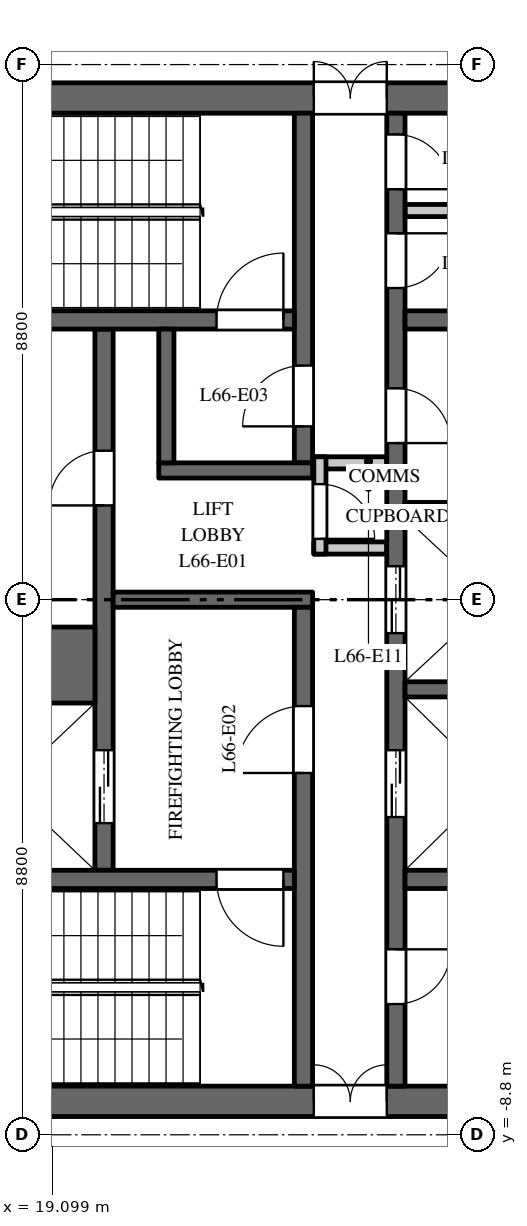
"""IFC4 building model, lengths in metres.
Left out: names, types, materials, properties, quantities, classifications, styles, units other than length and angle.
Written with IfcOpenShell. Run it as: python <this file> out.ifc"""

import sys

from ifc_helpers import new_model, si_unit, direction, frame, frame_2d, origin, place, context, subcontext, project, spatial, rectangle, extrude, element, fill, save


model = new_model("IFC4")
c1 = context("Model", 3, precision=1e-05, world=origin(), true_north=direction((0.0, 1.0)))
c2 = subcontext(c1, "Body", "Model", "MODEL_VIEW")
j1 = project(units=[si_unit("LENGTHUNIT", "METRE"), si_unit("PLANEANGLEUNIT", "RADIAN")], contexts=[c1])
p1 = place(None, origin())
s1 = spatial("IfcSite", under=j1, at=p1, CompositionType="ELEMENT")
p2 = place(p1, origin())
s2 = spatial("IfcBuilding", under=s1, at=p2, CompositionType="ELEMENT")
p3 = place(p2, frame((0.0, 0.0, 307.0)))
s3 = spatial("IfcBuildingStorey", under=s2, at=p3, CompositionType="ELEMENT", Elevation=307.0)
p4 = place(p3, frame((16.5, 8.25, 0.0), z_axis=(0.0, 0.0, 1.0), x_axis=(1.0, 0.0, 0.0)))
e1 = element("IfcWall", 1, at=p4, inside=s3, PredefinedType="SHEAR", context=c2, shape_type="SweptSolid", body=[
    extrude(rectangle(XDim=15.0, YDim=0.5, at=frame_2d((7.5, 0.0))), origin(), (0.0, 0.0, 1.0), 3.7),
])
p5 = place(p4, frame((6.9, 0.0, 0.0)))
e2 = element("IfcOpeningElement", 2, at=p5, cuts=e1, PredefinedType="OPENING", context=c2, shape_type="SweptSolid", body=[
    extrude(rectangle(XDim=1.2, YDim=2.1, at=frame_2d((0.6, 1.05))), frame((0.0, 0.26, 0.0), z_axis=(0.0, -1.0, 0.0), x_axis=(1.0, 0.0, 0.0)), (0.0, 0.0, 1.0), 0.52),
])
p6 = place(p4, frame((12.275, 0.0, 0.0)))
e3 = element("IfcOpeningElement", 3, at=p6, cuts=e1, PredefinedType="OPENING", context=c2, shape_type="SweptSolid", body=[
    extrude(rectangle(XDim=0.9, YDim=2.1, at=frame_2d((0.45, 1.05))), frame((0.0, 0.26, 0.0), z_axis=(0.0, -1.0, 0.0), x_axis=(1.0, 0.0, 0.0)), (0.0, 0.0, 1.0), 0.52),
])
p7 = place(p3, frame((16.5, -8.25, 0.0), z_axis=(0.0, 0.0, 1.0), x_axis=(1.0, 0.0, 0.0)))
e4 = element("IfcWall", 4, at=p7, inside=s3, PredefinedType="SHEAR", context=c2, shape_type="SweptSolid", body=[
    extrude(rectangle(XDim=15.0, YDim=0.5, at=frame_2d((7.5, 0.0))), origin(), (0.0, 0.0, 1.0), 3.7),
])
p8 = place(p7, frame((6.9, 0.0, 0.0)))
e5 = element("IfcOpeningElement", 5, at=p8, cuts=e4, PredefinedType="OPENING", context=c2, shape_type="SweptSolid", body=[
    extrude(rectangle(XDim=1.2, YDim=2.1, at=frame_2d((0.6, 1.05))), frame((0.0, 0.26, 0.0), z_axis=(0.0, -1.0, 0.0), x_axis=(1.0, 0.0, 0.0)), (0.0, 0.0, 1.0), 0.52),
])
p9 = place(p7, frame((12.95, 0.0, 0.0)))
e6 = element("IfcOpeningElement", 6, at=p9, cuts=e4, PredefinedType="OPENING", context=c2, shape_type="SweptSolid", body=[
    extrude(rectangle(XDim=0.9, YDim=2.1, at=frame_2d((0.45, 1.05))), frame((0.0, 0.26, 0.0), z_axis=(0.0, -1.0, 0.0), x_axis=(1.0, 0.0, 0.0)), (0.0, 0.0, 1.0), 0.52),
])
p10 = place(p3, frame((19.95, -4.45, 0.0), z_axis=(0.0, 0.0, 1.0), x_axis=(0.0, 1.0, 0.0)))
e7 = element("IfcWall", 7, at=p10, inside=s3, PredefinedType="SHEAR", context=c2, shape_type="SweptSolid", body=[
    extrude(rectangle(XDim=8.9, YDim=0.3, at=frame_2d((4.45, 0.0))), origin(), (0.0, 0.0, 1.0), 3.7),
])
p11 = place(p10, frame((0.775, 0.0, 0.0)))
e8 = element("IfcOpeningElement", 8, at=p11, cuts=e7, PredefinedType="OPENING", context=c2, shape_type="SweptSolid", body=[
    extrude(rectangle(XDim=1.2, YDim=2.1, at=frame_2d((0.6, 1.05))), frame((0.0, 0.16, 0.0), z_axis=(0.0, -1.0, 0.0), x_axis=(1.0, 0.0, 0.0)), (0.0, 0.0, 1.0), 0.32),
])
p12 = place(p10, frame((6.0, 0.0, 0.0)))
e9 = element("IfcOpeningElement", 9, at=p12, cuts=e7, PredefinedType="OPENING", context=c2, shape_type="SweptSolid", body=[
    extrude(rectangle(XDim=0.9, YDim=2.1, at=frame_2d((0.45, 1.05))), frame((0.0, 0.16, 0.0), z_axis=(0.0, -1.0, 0.0), x_axis=(1.0, 0.0, 0.0)), (0.0, 0.0, 1.0), 0.32),
])
p13 = place(p3, frame((24.75, -8.0, 0.0), z_axis=(0.0, 0.0, 1.0), x_axis=(0.0, 1.0, 0.0)))
e10 = element("IfcWall", 10, at=p13, inside=s3, PredefinedType="SHEAR", context=c2, shape_type="SweptSolid", body=[
    extrude(rectangle(XDim=16.0, YDim=0.3, at=frame_2d((8.0, 0.0))), origin(), (0.0, 0.0, 1.0), 3.7),
])
p14 = place(p13, frame((4.425, 0.0, 0.0)))
e11 = element("IfcOpeningElement", 11, at=p14, cuts=e10, PredefinedType="OPENING", context=c2, shape_type="SweptSolid", body=[
    extrude(rectangle(XDim=1.1, YDim=2.1, at=frame_2d((0.55, 1.05))), frame((0.0, 0.16, 0.0), z_axis=(0.0, -1.0, 0.0), x_axis=(1.0, 0.0, 0.0)), (0.0, 0.0, 1.0), 0.32),
])
p15 = place(p13, frame((7.45, 0.0, 0.0)))
e12 = element("IfcOpeningElement", 12, at=p15, cuts=e10, PredefinedType="OPENING", context=c2, shape_type="SweptSolid", body=[
    extrude(rectangle(XDim=1.1, YDim=2.1, at=frame_2d((0.55, 1.05))), frame((0.0, 0.16, 0.0), z_axis=(0.0, -1.0, 0.0), x_axis=(1.0, 0.0, 0.0)), (0.0, 0.0, 1.0), 0.32),
])
p16 = place(p13, frame((10.575, 0.0, 0.0)))
e13 = element("IfcOpeningElement", 13, at=p16, cuts=e10, PredefinedType="OPENING", context=c2, shape_type="SweptSolid", body=[
    extrude(rectangle(XDim=0.9, YDim=2.1, at=frame_2d((0.45, 1.05))), frame((0.0, 0.16, 0.0), z_axis=(0.0, -1.0, 0.0), x_axis=(1.0, 0.0, 0.0)), (0.0, 0.0, 1.0), 0.32),
])
p17 = place(p13, frame((13.125, 0.0, 0.0)))
e14 = element("IfcOpeningElement", 14, at=p17, cuts=e10, PredefinedType="OPENING", context=c2, shape_type="SweptSolid", body=[
    extrude(rectangle(XDim=0.9, YDim=2.1, at=frame_2d((0.45, 1.05))), frame((0.0, 0.16, 0.0), z_axis=(0.0, -1.0, 0.0), x_axis=(1.0, 0.0, 0.0)), (0.0, 0.0, 1.0), 0.32),
])
p18 = place(p13, frame((14.75, 0.0, 0.0)))
e15 = element("IfcOpeningElement", 15, at=p18, cuts=e10, PredefinedType="OPENING", context=c2, shape_type="SweptSolid", body=[
    extrude(rectangle(XDim=0.9, YDim=2.1, at=frame_2d((0.45, 1.05))), frame((0.0, 0.16, 0.0), z_axis=(0.0, -1.0, 0.0), x_axis=(1.0, 0.0, 0.0)), (0.0, 0.0, 1.0), 0.32),
])
p19 = place(p13, frame((1.35, 0.0, 0.0)))
e16 = element("IfcOpeningElement", 16, at=p19, cuts=e10, PredefinedType="OPENING", context=c2, shape_type="SweptSolid", body=[
    extrude(rectangle(XDim=0.9, YDim=2.1, at=frame_2d((0.45, 1.05))), frame((0.0, 0.16, 0.0), z_axis=(0.0, -1.0, 0.0), x_axis=(1.0, 0.0, 0.0)), (0.0, 0.0, 1.0), 0.32),
])
p20 = place(p3, frame((20.1, 0.0, 0.0), z_axis=(0.0, 0.0, 1.0), x_axis=(1.0, 0.0, 0.0)))
e17 = element("IfcWall", 17, at=p20, inside=s3, PredefinedType="SHEAR", context=c2, shape_type="SweptSolid", body=[
    extrude(rectangle(XDim=3.28, YDim=0.25, at=frame_2d((1.64, 0.0))), origin(), (0.0, 0.0, 1.0), 3.7),
])
for number, where, z_axis, x_axis in (
    (18, (23.4, 0.85, 0.0), (0.0, 0.0, 1.0), (1.0, 0.0, 0.0)),
    (19, (23.4, 2.25, 0.0), (0.0, 0.0, 1.0), (1.0, 0.0, 0.0)),
):
    element("IfcWall", number, at=place(p3, frame(where, z_axis=z_axis, x_axis=x_axis)), inside=s3, PredefinedType="PARTITIONING", context=c2, shape_type="SweptSolid", body=[
        extrude(rectangle(XDim=1.2, YDim=0.2, at=frame_2d((0.6, 0.0))), origin(), (0.0, 0.0, 1.0), 3.7),
    ])
p21 = place(p3, frame((23.5, 0.75, 0.0), z_axis=(0.0, 0.0, 1.0), x_axis=(0.0, 1.0, 0.0)))
e20 = element("IfcWall", 20, at=p21, inside=s3, PredefinedType="PARTITIONING", context=c2, shape_type="SweptSolid", body=[
    extrude(rectangle(XDim=1.6, YDim=0.2, at=frame_2d((0.8, 0.0))), origin(), (0.0, 0.0, 1.0), 3.7),
])
p22 = place(p21, frame((0.25, 0.0, 0.0)))
e21 = element("IfcOpeningElement", 21, at=p22, cuts=e20, PredefinedType="OPENING", context=c2, shape_type="SweptSolid", body=[
    extrude(rectangle(XDim=0.9, YDim=2.1, at=frame_2d((0.45, 1.05))), frame((0.0, 0.11, 0.0), z_axis=(0.0, -1.0, 0.0), x_axis=(1.0, 0.0, 0.0)), (0.0, 0.0, 1.0), 0.22),
])
p23 = place(p3, frame((24.9, 4.6, 0.0), z_axis=(0.0, 0.0, 1.0), x_axis=(1.0, 0.0, 0.0)))
e22 = element("IfcWall", 22, at=p23, inside=s3, PredefinedType="SHEAR", context=c2, shape_type="SweptSolid", body=[
    extrude(rectangle(XDim=6.1, YDim=0.3, at=frame_2d((3.05, 0.0))), origin(), (0.0, 0.0, 1.0), 3.7),
])
p24 = place(p3, frame((24.9, 6.4, 0.0), z_axis=(0.0, 0.0, 1.0), x_axis=(1.0, 0.0, 0.0)))
e23 = element("IfcWall", 23, at=p24, inside=s3, PredefinedType="PARTITIONING", context=c2, shape_type="SweptSolid", body=[
    extrude(rectangle(XDim=2.35, YDim=0.2, at=frame_2d((1.175, 0.0))), origin(), (0.0, 0.0, 1.0), 3.7),
])
p25 = place(p3, frame((24.9, -4.6, 0.0), z_axis=(0.0, 0.0, 1.0), x_axis=(1.0, 0.0, 0.0)))
e24 = element("IfcWall", 24, at=p25, inside=s3, PredefinedType="SHEAR", context=c2, shape_type="SweptSolid", body=[
    extrude(rectangle(XDim=6.1, YDim=0.3, at=frame_2d((3.05, 0.0))), origin(), (0.0, 0.0, 1.0), 3.7),
])
p26 = place(p25, frame((4.2, 0.0, 0.0)))
e25 = element("IfcOpeningElement", 25, at=p26, cuts=e24, PredefinedType="OPENING", context=c2, shape_type="SweptSolid", body=[
    extrude(rectangle(XDim=0.9, YDim=2.1, at=frame_2d((0.45, 1.05))), frame((0.0, 0.16, 0.0), z_axis=(0.0, -1.0, 0.0), x_axis=(1.0, 0.0, 0.0)), (0.0, 0.0, 1.0), 0.32),
])
p27 = place(p3, frame((16.9, -1.075, 0.0), z_axis=(0.0, 0.0, 1.0), x_axis=(1.0, 0.0, 0.0)))
e26 = element("IfcWall", 26, at=p27, inside=s3, PredefinedType="SHEAR", context=c2, shape_type="SweptSolid", body=[
    extrude(rectangle(XDim=2.9, YDim=1.25, at=frame_2d((1.45, 0.0))), origin(), (0.0, 0.0, 1.0), 3.7),
])
for number, where, z_axis, x_axis in (
    (27, (24.9, -1.475, 0.0), (0.0, 0.0, 1.0), (1.0, 0.0, 0.0)),
    (28, (24.9, 1.475, 0.0), (0.0, 0.0, 1.0), (1.0, 0.0, 0.0)),
):
    element("IfcWall", number, at=place(p3, frame(where, z_axis=z_axis, x_axis=x_axis)), inside=s3, PredefinedType="SHEAR", context=c2, shape_type="SweptSolid", body=[
        extrude(rectangle(XDim=2.9, YDim=0.25, at=frame_2d((1.45, 0.0))), origin(), (0.0, 0.0, 1.0), 3.7),
    ])
p28 = place(p3, frame((23.23, 2.25, 0.0), z_axis=(0.0, 0.0, 1.0), x_axis=(0.0, 1.0, 0.0)))
e29 = element("IfcWall", 29, at=p28, inside=s3, PredefinedType="SHEAR", context=c2, shape_type="SweptSolid", body=[
    extrude(rectangle(XDim=5.75, YDim=0.3, at=frame_2d((2.875, 0.0))), origin(), (0.0, 0.0, 1.0), 3.7),
])
p29 = place(p28, frame((0.6, 0.0, 0.0)))
e30 = element("IfcOpeningElement", 30, at=p29, cuts=e29, PredefinedType="OPENING", context=c2, shape_type="SweptSolid", body=[
    extrude(rectangle(XDim=1.0, YDim=2.1, at=frame_2d((0.5, 1.05))), frame((0.0, 0.16, 0.0), z_axis=(0.0, -1.0, 0.0), x_axis=(1.0, 0.0, 0.0)), (0.0, 0.0, 1.0), 0.32),
])
p30 = place(p3, frame((23.23, -8.0, 0.0), z_axis=(0.0, 0.0, 1.0), x_axis=(0.0, 1.0, 0.0)))
e31 = element("IfcWall", 31, at=p30, inside=s3, PredefinedType="SHEAR", context=c2, shape_type="SweptSolid", body=[
    extrude(rectangle(XDim=7.875, YDim=0.3, at=frame_2d((3.938, 0.0))), origin(), (0.0, 0.0, 1.0), 3.7),
])
p31 = place(p30, frame((5.15, 0.0, 0.0)))
e32 = element("IfcOpeningElement", 32, at=p31, cuts=e31, PredefinedType="OPENING", context=c2, shape_type="SweptSolid", body=[
    extrude(rectangle(XDim=1.1, YDim=2.1, at=frame_2d((0.55, 1.05))), frame((0.0, 0.16, 0.0), z_axis=(0.0, -1.0, 0.0), x_axis=(1.0, 0.0, 0.0)), (0.0, 0.0, 1.0), 0.32),
])
p32 = place(p3, frame((16.9, 4.6, 0.0), z_axis=(0.0, 0.0, 1.0), x_axis=(1.0, 0.0, 0.0)))
e33 = element("IfcWall", 33, at=p32, inside=s3, PredefinedType="SHEAR", context=c2, shape_type="SweptSolid", body=[
    extrude(rectangle(XDim=6.18, YDim=0.3, at=frame_2d((3.09, 0.0))), origin(), (0.0, 0.0, 1.0), 3.7),
])
p33 = place(p32, frame((4.9, 0.0, 0.0)))
e34 = element("IfcOpeningElement", 34, at=p33, cuts=e33, PredefinedType="OPENING", context=c2, shape_type="SweptSolid", body=[
    extrude(rectangle(XDim=1.1, YDim=2.1, at=frame_2d((0.55, 1.05))), frame((0.0, 0.16, 0.0), z_axis=(0.0, -1.0, 0.0), x_axis=(1.0, 0.0, 0.0)), (0.0, 0.0, 1.0), 0.32),
])
p34 = place(p3, frame((16.9, -4.6, 0.0), z_axis=(0.0, 0.0, 1.0), x_axis=(1.0, 0.0, 0.0)))
e35 = element("IfcWall", 35, at=p34, inside=s3, PredefinedType="SHEAR", context=c2, shape_type="SweptSolid", body=[
    extrude(rectangle(XDim=6.18, YDim=0.3, at=frame_2d((3.09, 0.0))), origin(), (0.0, 0.0, 1.0), 3.7),
])
p35 = place(p34, frame((4.9, 0.0, 0.0)))
e36 = element("IfcOpeningElement", 36, at=p35, cuts=e35, PredefinedType="OPENING", context=c2, shape_type="SweptSolid", body=[
    extrude(rectangle(XDim=1.1, YDim=2.1, at=frame_2d((0.55, 1.05))), frame((0.0, 0.16, 0.0), z_axis=(0.0, -1.0, 0.0), x_axis=(1.0, 0.0, 0.0)), (0.0, 0.0, 1.0), 0.32),
])
p36 = place(p3, frame((20.85, 2.125, 0.0), z_axis=(0.0, 0.0, 1.0), x_axis=(1.0, 0.0, 0.0)))
e37 = element("IfcWall", 37, at=p36, inside=s3, PredefinedType="SHEAR", context=c2, shape_type="SweptSolid", body=[
    extrude(rectangle(XDim=2.53, YDim=0.25, at=frame_2d((1.265, 0.0))), origin(), (0.0, 0.0, 1.0), 3.7),
])
p37 = place(p3, frame((20.975, 2.25, 0.0), z_axis=(0.0, 0.0, 1.0), x_axis=(0.0, 1.0, 0.0)))
e38 = element("IfcWall", 38, at=p37, inside=s3, PredefinedType="SHEAR", context=c2, shape_type="SweptSolid", body=[
    extrude(rectangle(XDim=2.2, YDim=0.25, at=frame_2d((1.1, 0.0))), origin(), (0.0, 0.0, 1.0), 3.7),
])
p38 = place(p11, origin())
e39 = element("IfcDoor", 39, at=p38, inside=s3, OperationType="DOUBLE_DOOR_SLIDING", PredefinedType="DOOR", context=c2, shape_type="SweptSolid", body=[
    extrude(rectangle(XDim=1.2, YDim=2.1, at=frame_2d((0.6, 1.05))), frame((0.0, 0.025, 0.0), z_axis=(0.0, -1.0, 0.0), x_axis=(1.0, 0.0, 0.0)), (0.0, 0.0, 1.0), 0.05),
])
fill(e8, e39)
p39 = place(p14, origin())
e40 = element("IfcDoor", 40, at=p39, inside=s3, OperationType="DOUBLE_DOOR_SLIDING", PredefinedType="DOOR", context=c2, shape_type="SweptSolid", body=[
    extrude(rectangle(XDim=1.1, YDim=2.1, at=frame_2d((0.55, 1.05))), frame((0.0, 0.025, 0.0), z_axis=(0.0, -1.0, 0.0), x_axis=(1.0, 0.0, 0.0)), (0.0, 0.0, 1.0), 0.05),
])
fill(e11, e40)
p40 = place(p15, origin())
e41 = element("IfcDoor", 41, at=p40, inside=s3, OperationType="DOUBLE_DOOR_SLIDING", PredefinedType="DOOR", context=c2, shape_type="SweptSolid", body=[
    extrude(rectangle(XDim=1.1, YDim=2.1, at=frame_2d((0.55, 1.05))), frame((0.0, 0.025, 0.0), z_axis=(0.0, -1.0, 0.0), x_axis=(1.0, 0.0, 0.0)), (0.0, 0.0, 1.0), 0.05),
])
fill(e12, e41)
p41 = place(p33, origin())
e42 = element("IfcDoor", 42, at=p41, inside=s3, OperationType="SINGLE_SWING_LEFT", PredefinedType="DOOR", context=c2, shape_type="SweptSolid", body=[
    extrude(rectangle(XDim=1.1, YDim=2.1, at=frame_2d((0.55, 1.05))), frame((0.0, 0.025, 0.0), z_axis=(0.0, -1.0, 0.0), x_axis=(1.0, 0.0, 0.0)), (0.0, 0.0, 1.0), 0.05),
])
fill(e34, e42)
p42 = place(p35, origin())
e43 = element("IfcDoor", 43, at=p42, inside=s3, OperationType="SINGLE_SWING_RIGHT", PredefinedType="DOOR", context=c2, shape_type="SweptSolid", body=[
    extrude(rectangle(XDim=1.1, YDim=2.1, at=frame_2d((0.55, 1.05))), frame((0.0, 0.025, 0.0), z_axis=(0.0, -1.0, 0.0), x_axis=(1.0, 0.0, 0.0)), (0.0, 0.0, 1.0), 0.05),
])
fill(e36, e43)
p43 = place(p31, origin())
e44 = element("IfcDoor", 44, at=p43, inside=s3, OperationType="SINGLE_SWING_RIGHT", PredefinedType="DOOR", context=c2, shape_type="SweptSolid", body=[
    extrude(rectangle(XDim=1.1, YDim=2.1, at=frame_2d((0.55, 1.05))), frame((0.0, 0.025, 0.0), z_axis=(0.0, -1.0, 0.0), x_axis=(1.0, 0.0, 0.0)), (0.0, 0.0, 1.0), 0.05),
])
fill(e32, e44)
p44 = place(p29, origin())
e45 = element("IfcDoor", 45, at=p44, inside=s3, OperationType="SINGLE_SWING_RIGHT", PredefinedType="DOOR", context=c2, shape_type="SweptSolid", body=[
    extrude(rectangle(XDim=1.0, YDim=2.1, at=frame_2d((0.5, 1.05))), frame((0.0, 0.025, 0.0), z_axis=(0.0, -1.0, 0.0), x_axis=(1.0, 0.0, 0.0)), (0.0, 0.0, 1.0), 0.05),
])
fill(e30, e45)
p45 = place(p5, origin())
e46 = element("IfcDoor", 46, at=p45, inside=s3, OperationType="DOUBLE_DOOR_DOUBLE_SWING", PredefinedType="DOOR", context=c2, shape_type="SweptSolid", body=[
    extrude(rectangle(XDim=1.2, YDim=2.1, at=frame_2d((0.6, 1.05))), frame((0.0, 0.025, 0.0), z_axis=(0.0, -1.0, 0.0), x_axis=(1.0, 0.0, 0.0)), (0.0, 0.0, 1.0), 0.05),
])
fill(e2, e46)
p46 = place(p8, origin())
e47 = element("IfcDoor", 47, at=p46, inside=s3, OperationType="DOUBLE_DOOR_DOUBLE_SWING", PredefinedType="DOOR", context=c2, shape_type="SweptSolid", body=[
    extrude(rectangle(XDim=1.2, YDim=2.1, at=frame_2d((0.6, 1.05))), frame((0.0, 0.025, 0.0), z_axis=(0.0, -1.0, 0.0), x_axis=(1.0, 0.0, 0.0)), (0.0, 0.0, 1.0), 0.05),
])
fill(e5, e47)
p47 = place(p12, origin())
e48 = element("IfcDoor", 48, at=p47, inside=s3, OperationType="SINGLE_SWING_RIGHT", PredefinedType="DOOR", context=c2, shape_type="SweptSolid", body=[
    extrude(rectangle(XDim=0.9, YDim=2.1, at=frame_2d((0.45, 1.05))), frame((0.0, 0.025, 0.0), z_axis=(0.0, -1.0, 0.0), x_axis=(1.0, 0.0, 0.0)), (0.0, 0.0, 1.0), 0.05),
])
fill(e9, e48)
p48 = place(p16, origin())
e49 = element("IfcDoor", 49, at=p48, inside=s3, OperationType="SINGLE_SWING_LEFT", PredefinedType="DOOR", context=c2, shape_type="SweptSolid", body=[
    extrude(rectangle(XDim=0.9, YDim=2.1, at=frame_2d((0.45, 1.05))), frame((0.0, 0.025, 0.0), z_axis=(0.0, -1.0, 0.0), x_axis=(1.0, 0.0, 0.0)), (0.0, 0.0, 1.0), 0.05),
])
fill(e13, e49)
p49 = place(p17, origin())
e50 = element("IfcDoor", 50, at=p49, inside=s3, OperationType="SINGLE_SWING_RIGHT", PredefinedType="DOOR", context=c2, shape_type="SweptSolid", body=[
    extrude(rectangle(XDim=0.9, YDim=2.1, at=frame_2d((0.45, 1.05))), frame((0.0, 0.025, 0.0), z_axis=(0.0, -1.0, 0.0), x_axis=(1.0, 0.0, 0.0)), (0.0, 0.0, 1.0), 0.05),
])
fill(e14, e50)
p50 = place(p18, origin())
e51 = element("IfcDoor", 51, at=p50, inside=s3, OperationType="SINGLE_SWING_LEFT", PredefinedType="DOOR", context=c2, shape_type="SweptSolid", body=[
    extrude(rectangle(XDim=0.9, YDim=2.1, at=frame_2d((0.45, 1.05))), frame((0.0, 0.025, 0.0), z_axis=(0.0, -1.0, 0.0), x_axis=(1.0, 0.0, 0.0)), (0.0, 0.0, 1.0), 0.05),
])
fill(e15, e51)
p51 = place(p19, origin())
e52 = element("IfcDoor", 52, at=p51, inside=s3, OperationType="SINGLE_SWING_RIGHT", PredefinedType="DOOR", context=c2, shape_type="SweptSolid", body=[
    extrude(rectangle(XDim=0.9, YDim=2.1, at=frame_2d((0.45, 1.05))), frame((0.0, 0.025, 0.0), z_axis=(0.0, -1.0, 0.0), x_axis=(1.0, 0.0, 0.0)), (0.0, 0.0, 1.0), 0.05),
])
fill(e16, e52)
p52 = place(p22, origin())
e53 = element("IfcDoor", 53, at=p52, inside=s3, OperationType="SINGLE_SWING_LEFT", PredefinedType="DOOR", context=c2, shape_type="SweptSolid", body=[
    extrude(rectangle(XDim=0.9, YDim=2.1, at=frame_2d((0.45, 1.05))), frame((0.0, 0.025, 0.0), z_axis=(0.0, -1.0, 0.0), x_axis=(1.0, 0.0, 0.0)), (0.0, 0.0, 1.0), 0.05),
])
fill(e21, e53)
save(model, sys.argv[1])
